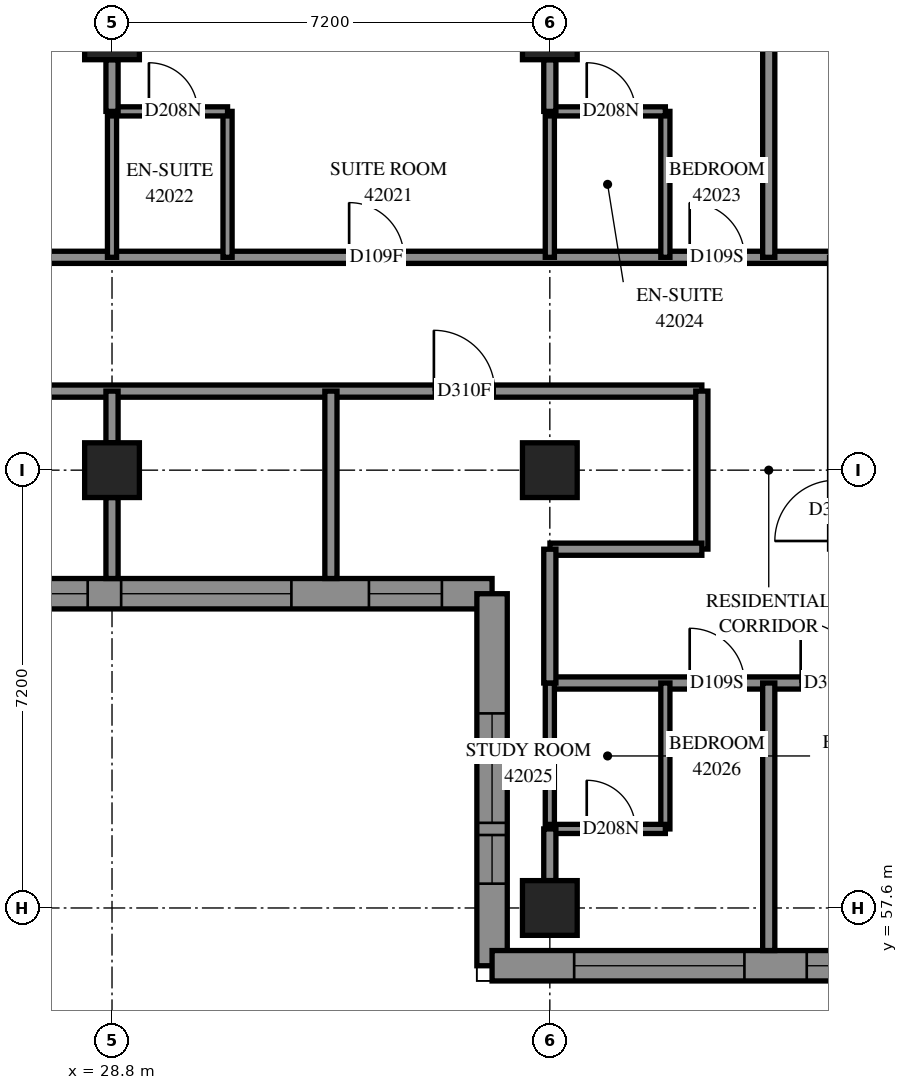
"""IFC4 building model, lengths in metres.
Left out: names, types, materials, properties, quantities, classifications, styles, units other than length and angle.
Written with IfcOpenShell. Run it as: python <this file> out.ifc"""

import sys

from ifc_helpers import new_model, si_unit, direction, frame, frame_2d, origin, origin_2d, place, context, subcontext, project, spatial, polyline, rectangle, outline, extrude, element, fill, save


model = new_model("IFC4")
c1 = context("Model", 3, precision=1e-05, world=origin(), true_north=direction((0.0, 1.0)))
c2 = subcontext(c1, "Body", "Model", "MODEL_VIEW")
j1 = project(units=[si_unit("LENGTHUNIT", "METRE"), si_unit("PLANEANGLEUNIT", "RADIAN")], contexts=[c1])
p1 = place(None, origin())
s1 = spatial("IfcSite", under=j1, at=p1, CompositionType="ELEMENT")
p2 = place(p1, origin())
s2 = spatial("IfcBuilding", under=s1, at=p2, CompositionType="ELEMENT")
p3 = place(p2, frame((0.0, 0.0, 155.8)))
s3 = spatial("IfcBuildingStorey", under=s2, at=p3, CompositionType="ELEMENT", Elevation=155.8)
for number, where, z_axis, x_axis in (
    (1, (28.8, 64.8, 0.0), (0.0, 0.0, 1.0), (1.0, 0.0, 0.0)),
    (2, (28.8, 72.0, 0.0), (0.0, 0.0, 1.0), (1.0, 0.0, 0.0)),
    (3, (36.0, 57.6, 0.0), (0.0, 0.0, 1.0), (1.0, 0.0, 0.0)),
    (4, (36.0, 64.8, 0.0), (0.0, 0.0, 1.0), (1.0, 0.0, 0.0)),
    (5, (36.0, 72.0, 0.0), (0.0, 0.0, 1.0), (1.0, 0.0, 0.0)),
):
    element("IfcColumn", number, at=place(p3, frame(where, z_axis=z_axis, x_axis=x_axis)), inside=s3, PredefinedType="COLUMN", context=c2, shape_type="SweptSolid", body=[
        extrude(rectangle(XDim=0.9, YDim=0.9, at=origin_2d()), origin(), (0.0, 0.0, 1.0), 3.1),
    ])
p4 = place(p3, frame((19.568, 62.768, 0.0), z_axis=(0.0, 0.0, 1.0), x_axis=(1.0, 0.0, 0.0)))
e6 = element("IfcWall", 6, at=p4, inside=s3, PredefinedType="SOLIDWALL", context=c2, shape_type="SweptSolid", body=[
    extrude(outline(polyline([(-0.25, -0.25), (15.232, -0.25), (15.732, 0.25), (0.25, 0.25), (-0.25, -0.25)])), origin(), (0.0, 0.0, 1.0), 3.1),
])
p5 = place(p4, frame((2.432, 0.0, 0.45)))
e7 = element("IfcOpeningElement", 7, at=p5, cuts=e6, PredefinedType="OPENING", context=c2, shape_type="SweptSolid", body=[
    extrude(rectangle(XDim=2.8, YDim=2.5, at=frame_2d((1.4, 1.25))), frame((0.0, 0.26, 0.0), z_axis=(0.0, -1.0, 0.0), x_axis=(1.0, 0.0, 0.0)), (0.0, 0.0, 1.0), 0.52),
])
p6 = place(p4, frame((6.032, 0.0, 0.45)))
e8 = element("IfcOpeningElement", 8, at=p6, cuts=e6, PredefinedType="OPENING", context=c2, shape_type="SweptSolid", body=[
    extrude(rectangle(XDim=2.8, YDim=2.5, at=frame_2d((1.4, 1.25))), frame((0.0, 0.26, 0.0), z_axis=(0.0, -1.0, 0.0), x_axis=(1.0, 0.0, 0.0)), (0.0, 0.0, 1.0), 0.52),
])
p7 = place(p4, frame((9.382, 0.0, 0.45)))
e9 = element("IfcOpeningElement", 9, at=p7, cuts=e6, PredefinedType="OPENING", context=c2, shape_type="SweptSolid", body=[
    extrude(rectangle(XDim=2.8, YDim=2.5, at=frame_2d((1.4, 1.25))), frame((0.0, 0.26, 0.0), z_axis=(0.0, -1.0, 0.0), x_axis=(1.0, 0.0, 0.0)), (0.0, 0.0, 1.0), 0.52),
])
p8 = place(p4, frame((0.641, 0.0, 0.45)))
e10 = element("IfcOpeningElement", 10, at=p8, cuts=e6, PredefinedType="OPENING", context=c2, shape_type="SweptSolid", body=[
    extrude(rectangle(XDim=1.2, YDim=2.5, at=frame_2d((0.6, 1.25))), frame((0.0, 0.26, 0.0), z_axis=(0.0, -1.0, 0.0), x_axis=(1.0, 0.0, 0.0)), (0.0, 0.0, 1.0), 0.52),
])
p9 = place(p4, frame((13.457, 0.0, 0.45)))
e11 = element("IfcOpeningElement", 11, at=p9, cuts=e6, PredefinedType="OPENING", context=c2, shape_type="SweptSolid", body=[
    extrude(rectangle(XDim=1.2, YDim=2.5, at=frame_2d((0.6, 1.25))), frame((0.0, 0.26, 0.0), z_axis=(0.0, -1.0, 0.0), x_axis=(1.0, 0.0, 0.0)), (0.0, 0.0, 1.0), 0.52),
])
p10 = place(p3, frame((35.05, 62.768, 0.0), z_axis=(0.0, 0.0, 1.0), x_axis=(0.0, -1.0, 0.0)))
e12 = element("IfcWall", 12, at=p10, inside=s3, PredefinedType="SOLIDWALL", context=c2, shape_type="SweptSolid", body=[
    extrude(outline(polyline([(0.25, -0.25), (6.368, -0.25), (5.868, 0.25), (-0.25, 0.25), (0.25, -0.25)])), origin(), (0.0, 0.0, 1.0), 3.1),
])
p11 = place(p10, frame((1.968, 0.0, 0.7)))
e13 = element("IfcOpeningElement", 13, at=p11, cuts=e12, PredefinedType="OPENING", context=c2, shape_type="SweptSolid", body=[
    extrude(rectangle(XDim=1.8, YDim=2.2, at=frame_2d((0.9, 1.1))), frame((0.0, 0.26, 0.0), z_axis=(0.0, -1.0, 0.0), x_axis=(1.0, 0.0, 0.0)), (0.0, 0.0, 1.0), 0.52),
])
p12 = place(p10, frame((3.968, 0.0, 0.45)))
e14 = element("IfcOpeningElement", 14, at=p12, cuts=e12, PredefinedType="OPENING", context=c2, shape_type="SweptSolid", body=[
    extrude(rectangle(XDim=0.8, YDim=2.5, at=frame_2d((0.4, 1.25))), frame((0.0, 0.26, 0.0), z_axis=(0.0, -1.0, 0.0), x_axis=(1.0, 0.0, 0.0)), (0.0, 0.0, 1.0), 0.52),
])
p13 = place(p3, frame((35.05, 56.65, 0.0), z_axis=(0.0, 0.0, 1.0), x_axis=(1.0, 0.0, 0.0)))
e15 = element("IfcWall", 15, at=p13, inside=s3, PredefinedType="SOLIDWALL", context=c2, shape_type="SweptSolid", body=[
    extrude(outline(polyline([(-0.25, -0.25), (6.95, -0.25), (7.45, 0.25), (0.25, 0.25), (-0.25, -0.25)])), origin(), (0.0, 0.0, 1.0), 3.1),
])
p14 = place(p13, frame((1.35, 0.0, 0.45)))
e16 = element("IfcOpeningElement", 16, at=p14, cuts=e15, PredefinedType="OPENING", context=c2, shape_type="SweptSolid", body=[
    extrude(rectangle(XDim=2.8, YDim=2.5, at=frame_2d((1.4, 1.25))), frame((0.0, 0.26, 0.0), z_axis=(0.0, -1.0, 0.0), x_axis=(1.0, 0.0, 0.0)), (0.0, 0.0, 1.0), 0.52),
])
p15 = place(p13, frame((5.175, 0.0, 0.45)))
e17 = element("IfcOpeningElement", 17, at=p15, cuts=e15, PredefinedType="OPENING", context=c2, shape_type="SweptSolid", body=[
    extrude(rectangle(XDim=1.2, YDim=2.5, at=frame_2d((0.6, 1.25))), frame((0.0, 0.26, 0.0), z_axis=(0.0, -1.0, 0.0), x_axis=(1.0, 0.0, 0.0)), (0.0, 0.0, 1.0), 0.52),
])
p16 = place(p3, frame((21.6, 68.3, 0.0), z_axis=(0.0, 0.0, 1.0), x_axis=(1.0, 0.0, 0.0)))
e18 = element("IfcWall", 18, at=p16, inside=s3, PredefinedType="PARTITIONING", context=c2, shape_type="SweptSolid", body=[
    extrude(rectangle(XDim=19.1, YDim=0.2, at=frame_2d((9.55, 0.0))), origin(), (0.0, 0.0, 1.0), 3.1),
])
p17 = place(p16, frame((3.899, 0.0, 0.0)))
e19 = element("IfcOpeningElement", 19, at=p17, cuts=e18, PredefinedType="OPENING", context=c2, shape_type="SweptSolid", body=[
    extrude(rectangle(XDim=0.9, YDim=2.1, at=frame_2d((0.45, 1.05))), frame((0.0, 0.11, 0.0), z_axis=(0.0, -1.0, 0.0), x_axis=(1.0, 0.0, 0.0)), (0.0, 0.0, 1.0), 0.22),
])
p18 = place(p16, frame((11.099, 0.0, 0.0)))
e20 = element("IfcOpeningElement", 20, at=p18, cuts=e18, PredefinedType="OPENING", context=c2, shape_type="SweptSolid", body=[
    extrude(rectangle(XDim=0.9, YDim=2.1, at=frame_2d((0.45, 1.05))), frame((0.0, 0.11, 0.0), z_axis=(0.0, -1.0, 0.0), x_axis=(1.0, 0.0, 0.0)), (0.0, 0.0, 1.0), 0.22),
])
p19 = place(p16, frame((16.7, 0.0, 0.0)))
e21 = element("IfcOpeningElement", 21, at=p19, cuts=e18, PredefinedType="OPENING", context=c2, shape_type="SweptSolid", body=[
    extrude(rectangle(XDim=0.9, YDim=2.1, at=frame_2d((0.45, 1.05))), frame((0.0, 0.11, 0.0), z_axis=(0.0, -1.0, 0.0), x_axis=(1.0, 0.0, 0.0)), (0.0, 0.0, 1.0), 0.22),
])
p20 = place(p3, frame((21.6, 66.1, 0.0), z_axis=(0.0, 0.0, 1.0), x_axis=(1.0, 0.0, 0.0)))
e22 = element("IfcWall", 22, at=p20, inside=s3, PredefinedType="PARTITIONING", context=c2, shape_type="SweptSolid", body=[
    extrude(rectangle(XDim=16.9, YDim=0.2, at=frame_2d((8.45, 0.0))), origin(), (0.0, 0.0, 1.0), 3.1),
])
p21 = place(p20, frame((12.493, 0.0, 0.0)))
e23 = element("IfcOpeningElement", 23, at=p21, cuts=e22, PredefinedType="OPENING", context=c2, shape_type="SweptSolid", body=[
    extrude(rectangle(XDim=1.0, YDim=2.1, at=frame_2d((0.5, 1.05))), frame((0.0, 0.11, 0.0), z_axis=(0.0, -1.0, 0.0), x_axis=(1.0, 0.0, 0.0)), (0.0, 0.0, 1.0), 0.22),
])
p22 = place(p3, frame((36.0, 61.3, 0.0), z_axis=(0.0, 0.0, 1.0), x_axis=(1.0, 0.0, 0.0)))
e24 = element("IfcWall", 24, at=p22, inside=s3, PredefinedType="PARTITIONING", context=c2, shape_type="SweptSolid", body=[
    extrude(rectangle(XDim=16.9, YDim=0.2, at=frame_2d((8.45, 0.0))), origin(), (0.0, 0.0, 1.0), 3.1),
])
p23 = place(p22, frame((2.3, 0.0, 0.0)))
e25 = element("IfcOpeningElement", 25, at=p23, cuts=e24, PredefinedType="OPENING", context=c2, shape_type="SweptSolid", body=[
    extrude(rectangle(XDim=0.9, YDim=2.1, at=frame_2d((0.45, 1.05))), frame((0.0, 0.11, 0.0), z_axis=(0.0, -1.0, 0.0), x_axis=(1.0, 0.0, 0.0)), (0.0, 0.0, 1.0), 0.22),
])
p24 = place(p22, frame((4.125, 0.0, 0.0)))
e26 = element("IfcOpeningElement", 26, at=p24, cuts=e24, PredefinedType="OPENING", context=c2, shape_type="SweptSolid", body=[
    extrude(rectangle(XDim=1.0, YDim=2.1, at=frame_2d((0.5, 1.05))), frame((0.0, 0.11, 0.0), z_axis=(0.0, -1.0, 0.0), x_axis=(1.0, 0.0, 0.0)), (0.0, 0.0, 1.0), 0.22),
])
p25 = place(p22, frame((9.5, 0.0, 0.0)))
e27 = element("IfcOpeningElement", 27, at=p25, cuts=e24, PredefinedType="OPENING", context=c2, shape_type="SweptSolid", body=[
    extrude(rectangle(XDim=0.9, YDim=2.1, at=frame_2d((0.45, 1.05))), frame((0.0, 0.11, 0.0), z_axis=(0.0, -1.0, 0.0), x_axis=(1.0, 0.0, 0.0)), (0.0, 0.0, 1.0), 0.22),
])
p26 = place(p22, frame((11.325, 0.0, 0.0)))
e28 = element("IfcOpeningElement", 28, at=p26, cuts=e24, PredefinedType="OPENING", context=c2, shape_type="SweptSolid", body=[
    extrude(rectangle(XDim=1.0, YDim=2.1, at=frame_2d((0.5, 1.05))), frame((0.0, 0.11, 0.0), z_axis=(0.0, -1.0, 0.0), x_axis=(1.0, 0.0, 0.0)), (0.0, 0.0, 1.0), 0.22),
])
p27 = place(p22, frame((15.647, 0.0, 0.0)))
e29 = element("IfcOpeningElement", 29, at=p27, cuts=e24, PredefinedType="OPENING", context=c2, shape_type="SweptSolid", body=[
    extrude(rectangle(XDim=1.0, YDim=2.1, at=frame_2d((0.5, 1.05))), frame((0.0, 0.11, 0.0), z_axis=(0.0, -1.0, 0.0), x_axis=(1.0, 0.0, 0.0)), (0.0, 0.0, 1.0), 0.22),
])
p28 = place(p3, frame((39.6, 68.3, 0.0), z_axis=(0.0, 0.0, 1.0), x_axis=(0.0, 1.0, 0.0)))
e30 = element("IfcWall", 30, at=p28, inside=s3, PredefinedType="PARTITIONING", context=c2, shape_type="SweptSolid", body=[
    extrude(rectangle(XDim=4.558, YDim=0.2, at=frame_2d((2.279, 0.0))), origin(), (0.0, 0.0, 1.0), 3.1),
])
p29 = place(p3, frame((39.6, 56.9, 0.0), z_axis=(0.0, 0.0, 1.0), x_axis=(0.0, 1.0, 0.0)))
e31 = element("IfcWall", 31, at=p29, inside=s3, PredefinedType="PARTITIONING", context=c2, shape_type="SweptSolid", body=[
    extrude(rectangle(XDim=4.4, YDim=0.2, at=frame_2d((2.2, 0.0))), origin(), (0.0, 0.0, 1.0), 3.1),
])
p30 = place(p3, frame((32.4, 63.018, 0.0), z_axis=(0.0, 0.0, 1.0), x_axis=(0.0, 1.0, 0.0)))
e32 = element("IfcWall", 32, at=p30, inside=s3, PredefinedType="PARTITIONING", context=c2, shape_type="SweptSolid", body=[
    extrude(rectangle(XDim=3.082, YDim=0.2, at=frame_2d((1.541, 0.0))), origin(), (0.0, 0.0, 1.0), 3.1),
])
p31 = place(p3, frame((38.5, 63.502, 0.0), z_axis=(0.0, 0.0, 1.0), x_axis=(0.0, 1.0, 0.0)))
e33 = element("IfcWall", 33, at=p31, inside=s3, PredefinedType="PARTITIONING", context=c2, shape_type="SweptSolid", body=[
    extrude(rectangle(XDim=2.598, YDim=0.2, at=frame_2d((1.299, 0.0))), origin(), (0.0, 0.0, 1.0), 3.1),
])
p32 = place(p3, frame((36.002, 63.5, 0.0), z_axis=(0.0, 0.0, 1.0), x_axis=(1.0, 0.0, 0.0)))
e34 = element("IfcWall", 34, at=p32, inside=s3, PredefinedType="PARTITIONING", context=c2, shape_type="SweptSolid", body=[
    extrude(rectangle(XDim=2.498, YDim=0.2, at=frame_2d((1.249, 0.0))), origin(), (0.0, 0.0, 1.0), 3.1),
])
for number, where, z_axis, x_axis in (
    (35, (28.8, 68.3, 0.0), (0.0, 0.0, 1.0), (0.0, 1.0, 0.0)),
    (36, (30.7, 68.3, 0.0), (0.0, 0.0, 1.0), (0.0, 1.0, 0.0)),
    (37, (37.9, 68.3, 0.0), (0.0, 0.0, 1.0), (0.0, 1.0, 0.0)),
    (38, (36.0, 68.3, 0.0), (0.0, 0.0, 1.0), (0.0, 1.0, 0.0)),
    (39, (37.9, 58.9, 0.0), (0.0, 0.0, 1.0), (0.0, 1.0, 0.0)),
):
    element("IfcWall", number, at=place(p3, frame(where, z_axis=z_axis, x_axis=x_axis)), inside=s3, PredefinedType="PARTITIONING", context=c2, shape_type="SweptSolid", body=[
        extrude(rectangle(XDim=2.4, YDim=0.15, at=frame_2d((1.2, 0.0))), origin(), (0.0, 0.0, 1.0), 3.1),
    ])
p33 = place(p3, frame((36.0, 58.9, 0.0), z_axis=(0.0, 0.0, 1.0), x_axis=(0.0, 1.0, 0.0)))
e40 = element("IfcWall", 40, at=p33, inside=s3, PredefinedType="PARTITIONING", context=c2, shape_type="SweptSolid", body=[
    extrude(rectangle(XDim=2.4, YDim=0.15, at=frame_2d((1.2, 0.0))), origin(), (0.0, 0.0, 1.0), 2.6),
])
p34 = place(p3, frame((36.0, 61.3, 0.0), z_axis=(0.0, 0.0, 1.0), x_axis=(0.0, 1.0, 0.0)))
e41 = element("IfcWall", 41, at=p34, inside=s3, PredefinedType="PARTITIONING", context=c2, shape_type="SweptSolid", body=[
    extrude(rectangle(XDim=2.2, YDim=0.2, at=frame_2d((1.1, 0.0))), origin(), (0.0, 0.0, 1.0), 2.6),
])
p35 = place(p3, frame((28.8, 70.7, 0.0), z_axis=(0.0, 0.0, 1.0), x_axis=(1.0, 0.0, 0.0)))
e42 = element("IfcWall", 42, at=p35, inside=s3, PredefinedType="PARTITIONING", context=c2, shape_type="SweptSolid", body=[
    extrude(rectangle(XDim=1.9, YDim=0.15, at=frame_2d((0.95, 0.0))), origin(), (0.0, 0.0, 1.0), 3.1),
])
p36 = place(p35, frame((0.607, 0.0, 0.0)))
e43 = element("IfcOpeningElement", 43, at=p36, cuts=e42, PredefinedType="OPENING", context=c2, shape_type="SweptSolid", body=[
    extrude(rectangle(XDim=0.8, YDim=2.1, at=frame_2d((0.4, 1.05))), frame((0.0, 0.085, 0.0), z_axis=(0.0, -1.0, 0.0), x_axis=(1.0, 0.0, 0.0)), (0.0, 0.0, 1.0), 0.17),
])
p37 = place(p3, frame((36.0, 70.7, 0.0), z_axis=(0.0, 0.0, 1.0), x_axis=(1.0, 0.0, 0.0)))
e44 = element("IfcWall", 44, at=p37, inside=s3, PredefinedType="PARTITIONING", context=c2, shape_type="SweptSolid", body=[
    extrude(rectangle(XDim=1.9, YDim=0.15, at=frame_2d((0.95, 0.0))), origin(), (0.0, 0.0, 1.0), 3.1),
])
p38 = place(p37, frame((0.607, 0.0, 0.0)))
e45 = element("IfcOpeningElement", 45, at=p38, cuts=e44, PredefinedType="OPENING", context=c2, shape_type="SweptSolid", body=[
    extrude(rectangle(XDim=0.8, YDim=2.1, at=frame_2d((0.4, 1.05))), frame((0.0, 0.085, 0.0), z_axis=(0.0, -1.0, 0.0), x_axis=(1.0, 0.0, 0.0)), (0.0, 0.0, 1.0), 0.17),
])
p39 = place(p3, frame((36.0, 58.9, 0.0), z_axis=(0.0, 0.0, 1.0), x_axis=(1.0, 0.0, 0.0)))
e46 = element("IfcWall", 46, at=p39, inside=s3, PredefinedType="PARTITIONING", context=c2, shape_type="SweptSolid", body=[
    extrude(rectangle(XDim=1.9, YDim=0.15, at=frame_2d((0.95, 0.0))), origin(), (0.0, 0.0, 1.0), 3.1),
])
p40 = place(p39, frame((0.607, 0.0, 0.0)))
e47 = element("IfcOpeningElement", 47, at=p40, cuts=e46, PredefinedType="OPENING", context=c2, shape_type="SweptSolid", body=[
    extrude(rectangle(XDim=0.8, YDim=2.1, at=frame_2d((0.4, 1.05))), frame((0.0, 0.085, 0.0), z_axis=(0.0, -1.0, 0.0), x_axis=(1.0, 0.0, 0.0)), (0.0, 0.0, 1.0), 0.17),
])
p41 = place(p3, frame((28.8, 63.018, 0.0), z_axis=(0.0, 0.0, 1.0), x_axis=(0.0, 1.0, 0.0)))
e48 = element("IfcWall", 48, at=p41, inside=s3, PredefinedType="PARTITIONING", context=c2, shape_type="SweptSolid", body=[
    extrude(rectangle(XDim=1.332, YDim=0.2, at=frame_2d((0.666, 0.0))), origin(), (0.0, 0.0, 1.0), 3.1),
])
p42 = place(p3, frame((36.0, 58.05, 0.0), z_axis=(0.0, 0.0, 1.0), x_axis=(0.0, 1.0, 0.0)))
e49 = element("IfcWall", 49, at=p42, inside=s3, PredefinedType="PARTITIONING", context=c2, shape_type="SweptSolid", body=[
    extrude(rectangle(XDim=0.85, YDim=0.2, at=frame_2d((0.425, 0.0))), origin(), (0.0, 0.0, 1.0), 2.6),
])
for number, where, z_axis, x_axis in (
    (50, (28.8, 65.25, 0.0), (0.0, 0.0, 1.0), (0.0, 1.0, 0.0)),
    (51, (28.8, 70.7, 0.0), (0.0, 0.0, 1.0), (0.0, 1.0, 0.0)),
    (52, (36.0, 70.7, 0.0), (0.0, 0.0, 1.0), (0.0, 1.0, 0.0)),
):
    element("IfcWall", number, at=place(p3, frame(where, z_axis=z_axis, x_axis=x_axis)), inside=s3, PredefinedType="PARTITIONING", context=c2, shape_type="SweptSolid", body=[
        extrude(rectangle(XDim=0.85, YDim=0.2, at=frame_2d((0.425, 0.0))), origin(), (0.0, 0.0, 1.0), 3.1),
    ])
p43 = place(p6, origin())
e53 = element("IfcWindow", 53, at=p43, inside=s3, PartitioningType="SINGLE_PANEL", PredefinedType="WINDOW", context=c2, shape_type="SweptSolid", body=[
    extrude(rectangle(XDim=2.8, YDim=2.5, at=frame_2d((1.4, 1.25))), frame((0.0, 0.18, 0.0), z_axis=(0.0, -1.0, 0.0), x_axis=(1.0, 0.0, 0.0)), (0.0, 0.0, 1.0), 0.06),
])
fill(e8, e53)
p44 = place(p7, origin())
e54 = element("IfcWindow", 54, at=p44, inside=s3, PartitioningType="SINGLE_PANEL", PredefinedType="WINDOW", context=c2, shape_type="SweptSolid", body=[
    extrude(rectangle(XDim=2.8, YDim=2.5, at=frame_2d((1.4, 1.25))), frame((0.0, 0.18, 0.0), z_axis=(0.0, -1.0, 0.0), x_axis=(1.0, 0.0, 0.0)), (0.0, 0.0, 1.0), 0.06),
])
fill(e9, e54)
p45 = place(p9, origin())
e55 = element("IfcWindow", 55, at=p45, inside=s3, PartitioningType="SINGLE_PANEL", PredefinedType="WINDOW", context=c2, shape_type="SweptSolid", body=[
    extrude(rectangle(XDim=1.2, YDim=2.5, at=frame_2d((0.6, 1.25))), frame((0.0, 0.18, 0.0), z_axis=(0.0, -1.0, 0.0), x_axis=(1.0, 0.0, 0.0)), (0.0, 0.0, 1.0), 0.06),
])
fill(e11, e55)
p46 = place(p14, origin())
e56 = element("IfcWindow", 56, at=p46, inside=s3, PartitioningType="SINGLE_PANEL", PredefinedType="WINDOW", context=c2, shape_type="SweptSolid", body=[
    extrude(rectangle(XDim=2.8, YDim=2.5, at=frame_2d((1.4, 1.25))), frame((0.0, 0.18, 0.0), z_axis=(0.0, -1.0, 0.0), x_axis=(1.0, 0.0, 0.0)), (0.0, 0.0, 1.0), 0.06),
])
fill(e16, e56)
p47 = place(p15, origin())
e57 = element("IfcWindow", 57, at=p47, inside=s3, PartitioningType="SINGLE_PANEL", PredefinedType="WINDOW", context=c2, shape_type="SweptSolid", body=[
    extrude(rectangle(XDim=1.2, YDim=2.5, at=frame_2d((0.6, 1.25))), frame((0.0, 0.18, 0.0), z_axis=(0.0, -1.0, 0.0), x_axis=(1.0, 0.0, 0.0)), (0.0, 0.0, 1.0), 0.06),
])
fill(e17, e57)
p48 = place(p18, origin())
e58 = element("IfcDoor", 58, at=p48, inside=s3, OperationType="SINGLE_SWING_RIGHT", PredefinedType="DOOR", context=c2, shape_type="SweptSolid", body=[
    extrude(rectangle(XDim=0.9, YDim=2.1, at=frame_2d((0.45, 1.05))), frame((0.0, 0.025, 0.0), z_axis=(0.0, -1.0, 0.0), x_axis=(1.0, 0.0, 0.0)), (0.0, 0.0, 1.0), 0.05),
])
fill(e20, e58)
p49 = place(p36, origin())
e59 = element("IfcDoor", 59, at=p49, inside=s3, OperationType="SINGLE_SWING_RIGHT", PredefinedType="DOOR", context=c2, shape_type="SweptSolid", body=[
    extrude(rectangle(XDim=0.8, YDim=2.1, at=frame_2d((0.4, 1.05))), frame((0.0, 0.025, 0.0), z_axis=(0.0, -1.0, 0.0), x_axis=(1.0, 0.0, 0.0)), (0.0, 0.0, 1.0), 0.05),
])
fill(e43, e59)
p50 = place(p19, origin())
e60 = element("IfcDoor", 60, at=p50, inside=s3, OperationType="SINGLE_SWING_RIGHT", PredefinedType="DOOR", context=c2, shape_type="SweptSolid", body=[
    extrude(rectangle(XDim=0.9, YDim=2.1, at=frame_2d((0.45, 1.05))), frame((0.0, 0.025, 0.0), z_axis=(0.0, -1.0, 0.0), x_axis=(1.0, 0.0, 0.0)), (0.0, 0.0, 1.0), 0.05),
])
fill(e21, e60)
p51 = place(p38, origin())
e61 = element("IfcDoor", 61, at=p51, inside=s3, OperationType="SINGLE_SWING_RIGHT", PredefinedType="DOOR", context=c2, shape_type="SweptSolid", body=[
    extrude(rectangle(XDim=0.8, YDim=2.1, at=frame_2d((0.4, 1.05))), frame((0.0, 0.025, 0.0), z_axis=(0.0, -1.0, 0.0), x_axis=(1.0, 0.0, 0.0)), (0.0, 0.0, 1.0), 0.05),
])
fill(e45, e61)
p52 = place(p21, origin())
e62 = element("IfcDoor", 62, at=p52, inside=s3, OperationType="SINGLE_SWING_RIGHT", PredefinedType="DOOR", context=c2, shape_type="SweptSolid", body=[
    extrude(rectangle(XDim=1.0, YDim=2.1, at=frame_2d((0.5, 1.05))), frame((0.0, 0.025, 0.0), z_axis=(0.0, -1.0, 0.0), x_axis=(1.0, 0.0, 0.0)), (0.0, 0.0, 1.0), 0.05),
])
fill(e23, e62)
p53 = place(p23, origin())
e63 = element("IfcDoor", 63, at=p53, inside=s3, OperationType="SINGLE_SWING_LEFT", PredefinedType="DOOR", context=c2, shape_type="SweptSolid", body=[
    extrude(rectangle(XDim=0.9, YDim=2.1, at=frame_2d((0.45, 1.05))), frame((0.0, 0.025, 0.0), z_axis=(0.0, -1.0, 0.0), x_axis=(1.0, 0.0, 0.0)), (0.0, 0.0, 1.0), 0.05),
])
fill(e25, e63)
p54 = place(p40, origin())
e64 = element("IfcDoor", 64, at=p54, inside=s3, OperationType="SINGLE_SWING_RIGHT", PredefinedType="DOOR", context=c2, shape_type="SweptSolid", body=[
    extrude(rectangle(XDim=0.8, YDim=2.1, at=frame_2d((0.4, 1.05))), frame((0.0, 0.025, 0.0), z_axis=(0.0, -1.0, 0.0), x_axis=(1.0, 0.0, 0.0)), (0.0, 0.0, 1.0), 0.05),
])
fill(e47, e64)
p55 = place(p24, origin())
e65 = element("IfcDoor", 65, at=p55, inside=s3, OperationType="SINGLE_SWING_RIGHT", PredefinedType="DOOR", context=c2, shape_type="SweptSolid", body=[
    extrude(rectangle(XDim=1.0, YDim=2.1, at=frame_2d((0.5, 1.05))), frame((0.0, 0.025, 0.0), z_axis=(0.0, -1.0, 0.0), x_axis=(1.0, 0.0, 0.0)), (0.0, 0.0, 1.0), 0.05),
])
fill(e26, e65)
p56 = place(p11, origin())
e66 = element("IfcWindow", 66, at=p56, inside=s3, PartitioningType="SINGLE_PANEL", PredefinedType="WINDOW", context=c2, shape_type="SweptSolid", body=[
    extrude(rectangle(XDim=1.8, YDim=2.2, at=frame_2d((0.9, 1.1))), frame((0.0, 0.18, 0.0), z_axis=(0.0, -1.0, 0.0), x_axis=(1.0, 0.0, 0.0)), (0.0, 0.0, 1.0), 0.06),
])
fill(e13, e66)
p57 = place(p12, origin())
e67 = element("IfcWindow", 67, at=p57, inside=s3, PartitioningType="SINGLE_PANEL", PredefinedType="WINDOW", context=c2, shape_type="SweptSolid", body=[
    extrude(rectangle(XDim=0.8, YDim=2.5, at=frame_2d((0.4, 1.25))), frame((0.0, 0.18, 0.0), z_axis=(0.0, -1.0, 0.0), x_axis=(1.0, 0.0, 0.0)), (0.0, 0.0, 1.0), 0.06),
])
fill(e14, e67)
save(model, sys.argv[1])
